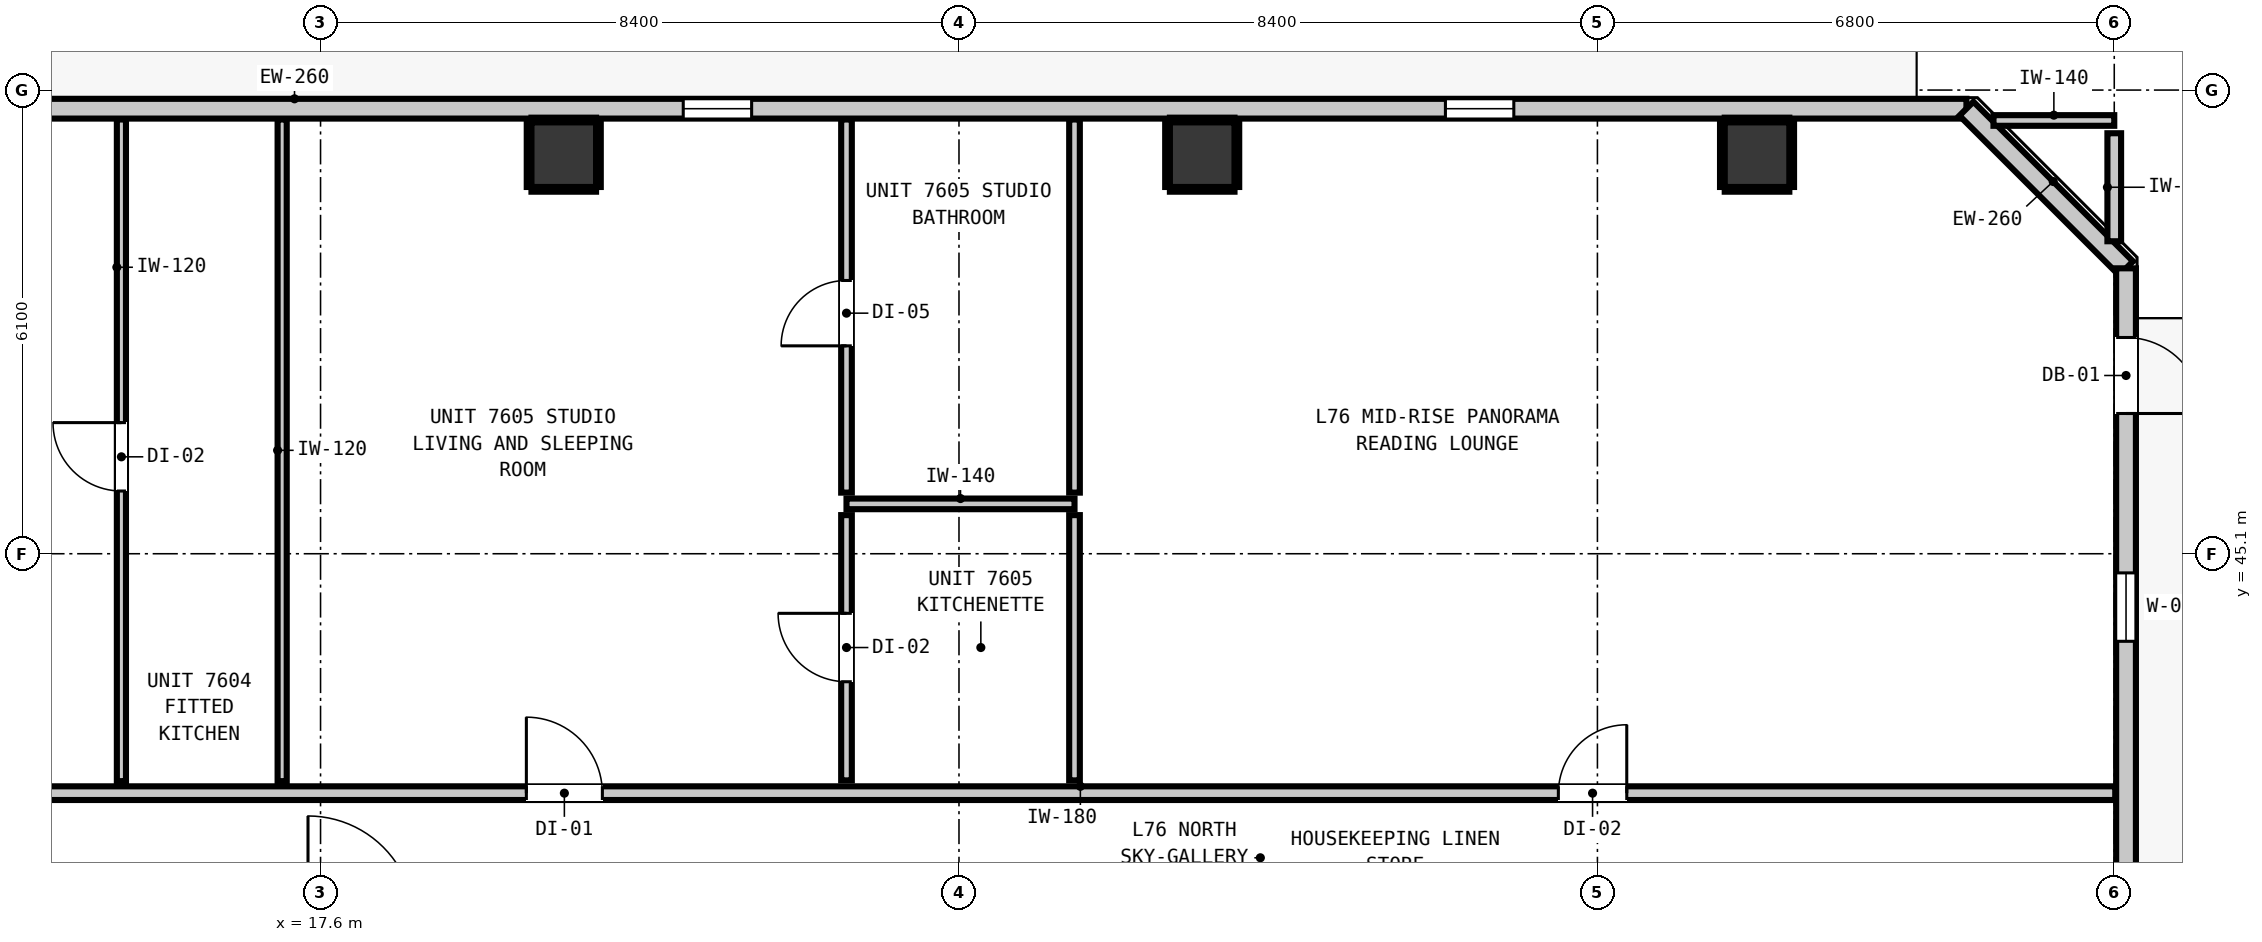
"""IFC4 building model, lengths in metres.
Left out: names, types, materials, properties, quantities, classifications, styles, units other than length and angle.
Written with IfcOpenShell. Run it as: python <this file> out.ifc"""

import sys

from ifc_helpers import new_model, si_unit, direction, frame, frame_2d, origin, origin_2d, place, context, subcontext, project, spatial, rectangle, extrude, element, fill, save


model = new_model("IFC4")
c1 = context("Model", 3, precision=1e-05, world=origin(), true_north=direction((0.0, 1.0)))
c2 = subcontext(c1, "Body", "Model", "MODEL_VIEW")
j1 = project(units=[si_unit("LENGTHUNIT", "METRE"), si_unit("PLANEANGLEUNIT", "RADIAN")], contexts=[c1])
p1 = place(None, origin())
s1 = spatial("IfcSite", under=j1, at=p1, CompositionType="ELEMENT")
p2 = place(p1, origin())
s2 = spatial("IfcBuilding", under=s1, at=p2, CompositionType="ELEMENT")
p3 = place(p2, frame((0.0, 0.0, 262.24)))
s3 = spatial("IfcBuildingStorey", under=s2, at=p3, CompositionType="ELEMENT", Elevation=262.24)
for number, where, z_axis, x_axis in (
    (1, (20.8, 50.35, 0.0), (0.0, 0.0, 1.0), (1.0, 0.0, 0.0)),
    (2, (29.2, 50.35, 0.0), (0.0, 0.0, 1.0), (1.0, 0.0, 0.0)),
    (3, (36.5, 50.35, 0.0), (0.0, 0.0, 1.0), (1.0, 0.0, 0.0)),
):
    element("IfcColumn", number, at=place(p3, frame(where, z_axis=z_axis, x_axis=x_axis)), inside=s3, PredefinedType="COLUMN", context=c2, shape_type="SweptSolid", body=[
        extrude(rectangle(XDim=0.85, YDim=0.85, at=origin_2d()), origin(), (0.0, 0.0, 1.0), 3.32),
    ])
p4 = place(p3, frame((6.545, 50.955, 0.0), z_axis=(0.0, 0.0, 1.0), x_axis=(1.0, 0.0, 0.0)))
e4 = element("IfcWall", 4, at=p4, inside=s3, PredefinedType="STANDARD", context=c2, shape_type="SweptSolid", body=[
    extrude(rectangle(XDim=32.71, YDim=0.26, at=frame_2d((16.355, 0.0))), origin(), (0.0, 0.0, 1.0), 3.1),
])
p5 = place(p4, frame((2.665, 0.0, 0.0)))
e5 = element("IfcOpeningElement", 5, at=p5, cuts=e4, PredefinedType="OPENING", context=c2, shape_type="SweptSolid", body=[
    extrude(rectangle(XDim=1.0, YDim=2.15, at=frame_2d((0.5, 1.075))), frame((0.0, 0.14, 0.0), z_axis=(0.0, -1.0, 0.0), x_axis=(1.0, 0.0, 0.0)), (0.0, 0.0, 1.0), 0.28),
])
p6 = place(p4, frame((4.698, 0.0, 0.85)))
e6 = element("IfcOpeningElement", 6, at=p6, cuts=e4, PredefinedType="OPENING", context=c2, shape_type="SweptSolid", body=[
    extrude(rectangle(XDim=0.9, YDim=1.5, at=frame_2d((0.45, 0.75))), frame((0.0, 0.14, 0.0), z_axis=(0.0, -1.0, 0.0), x_axis=(1.0, 0.0, 0.0)), (0.0, 0.0, 1.0), 0.28),
])
p7 = place(p4, frame((0.509, 0.0, 0.85)))
e7 = element("IfcOpeningElement", 7, at=p7, cuts=e4, PredefinedType="OPENING", context=c2, shape_type="SweptSolid", body=[
    extrude(rectangle(XDim=0.9, YDim=1.5, at=frame_2d((0.45, 0.75))), frame((0.0, 0.14, 0.0), z_axis=(0.0, -1.0, 0.0), x_axis=(1.0, 0.0, 0.0)), (0.0, 0.0, 1.0), 0.28),
])
p8 = place(p4, frame((15.827, 0.0, 0.85)))
e8 = element("IfcOpeningElement", 8, at=p8, cuts=e4, PredefinedType="OPENING", context=c2, shape_type="SweptSolid", body=[
    extrude(rectangle(XDim=0.9, YDim=1.5, at=frame_2d((0.45, 0.75))), frame((0.0, 0.14, 0.0), z_axis=(0.0, -1.0, 0.0), x_axis=(1.0, 0.0, 0.0)), (0.0, 0.0, 1.0), 0.28),
])
p9 = place(p4, frame((25.855, 0.0, 0.85)))
e9 = element("IfcOpeningElement", 9, at=p9, cuts=e4, PredefinedType="OPENING", context=c2, shape_type="SweptSolid", body=[
    extrude(rectangle(XDim=0.9, YDim=1.5, at=frame_2d((0.45, 0.75))), frame((0.0, 0.14, 0.0), z_axis=(0.0, -1.0, 0.0), x_axis=(1.0, 0.0, 0.0)), (0.0, 0.0, 1.0), 0.28),
])
p10 = place(p3, frame((39.255, 50.955, 0.0), z_axis=(0.0, 0.0, 1.0), x_axis=(0.707106781187, -0.707106781187, 0.0)))
e10 = element("IfcWall", 10, at=p10, inside=s3, PredefinedType="STANDARD", context=c2, shape_type="SweptSolid", body=[
    extrude(rectangle(XDim=2.97, YDim=0.26, at=frame_2d((1.485, 0.0))), origin(), (0.0, 0.0, 1.0), 3.1),
])
p11 = place(p3, frame((41.355, 48.855, 0.0), z_axis=(0.0, 0.0, 1.0), x_axis=(0.0, -1.0, 0.0)))
e11 = element("IfcWall", 11, at=p11, inside=s3, PredefinedType="STANDARD", context=c2, shape_type="SweptSolid", body=[
    extrude(rectangle(XDim=30.31, YDim=0.26, at=frame_2d((15.155, 0.0))), origin(), (0.0, 0.0, 1.0), 3.1),
])
p12 = place(p11, frame((0.91, 0.0, 0.0)))
e12 = element("IfcOpeningElement", 12, at=p12, cuts=e11, PredefinedType="OPENING", context=c2, shape_type="SweptSolid", body=[
    extrude(rectangle(XDim=1.0, YDim=2.15, at=frame_2d((0.5, 1.075))), frame((0.0, 0.14, 0.0), z_axis=(0.0, -1.0, 0.0), x_axis=(1.0, 0.0, 0.0)), (0.0, 0.0, 1.0), 0.28),
])
p13 = place(p11, frame((4.007, 0.0, 0.85)))
e13 = element("IfcOpeningElement", 13, at=p13, cuts=e11, PredefinedType="OPENING", context=c2, shape_type="SweptSolid", body=[
    extrude(rectangle(XDim=0.9, YDim=1.5, at=frame_2d((0.45, 0.75))), frame((0.0, 0.14, 0.0), z_axis=(0.0, -1.0, 0.0), x_axis=(1.0, 0.0, 0.0)), (0.0, 0.0, 1.0), 0.28),
])
p14 = place(p3, frame((4.587, 41.95, 0.0), z_axis=(0.0, 0.0, 1.0), x_axis=(1.0, 0.0, 0.0)))
e14 = element("IfcWall", 14, at=p14, inside=s3, PredefinedType="PARTITIONING", context=c2, shape_type="SweptSolid", body=[
    extrude(rectangle(XDim=36.626, YDim=0.18, at=frame_2d((18.313, 0.0))), origin(), (0.0, 0.0, 1.0), 3.1),
])
p15 = place(p14, frame((6.639, 0.0, 0.0)))
e15 = element("IfcOpeningElement", 15, at=p15, cuts=e14, PredefinedType="OPENING", context=c2, shape_type="SweptSolid", body=[
    extrude(rectangle(XDim=1.0, YDim=2.15, at=frame_2d((0.5, 1.075))), frame((0.0, 0.1, 0.0), z_axis=(0.0, -1.0, 0.0), x_axis=(1.0, 0.0, 0.0)), (0.0, 0.0, 1.0), 0.2),
])
p16 = place(p14, frame((15.721, 0.0, 0.0)))
e16 = element("IfcOpeningElement", 16, at=p16, cuts=e14, PredefinedType="OPENING", context=c2, shape_type="SweptSolid", body=[
    extrude(rectangle(XDim=1.0, YDim=2.15, at=frame_2d((0.5, 1.075))), frame((0.0, 0.1, 0.0), z_axis=(0.0, -1.0, 0.0), x_axis=(1.0, 0.0, 0.0)), (0.0, 0.0, 1.0), 0.2),
])
p17 = place(p14, frame((29.299, 0.0, 0.0)))
e17 = element("IfcOpeningElement", 17, at=p17, cuts=e14, PredefinedType="OPENING", context=c2, shape_type="SweptSolid", body=[
    extrude(rectangle(XDim=0.9, YDim=2.1, at=frame_2d((0.45, 1.05))), frame((0.0, 0.1, 0.0), z_axis=(0.0, -1.0, 0.0), x_axis=(1.0, 0.0, 0.0)), (0.0, 0.0, 1.0), 0.2),
])
p18 = place(p3, frame((24.52, 45.756, 0.0), z_axis=(0.0, 0.0, 1.0), x_axis=(1.0, 0.0, 0.0)))
e18 = element("IfcWall", 18, at=p18, inside=s3, PredefinedType="PARTITIONING", context=c2, shape_type="SweptSolid", body=[
    extrude(rectangle(XDim=3.0, YDim=0.14, at=frame_2d((1.5, 0.0))), origin(), (0.0, 0.0, 1.0), 3.1),
])
p19 = place(p3, frame((39.611, 50.8, 0.0), z_axis=(0.0, 0.0, 1.0), x_axis=(1.0, 0.0, 0.0)))
e19 = element("IfcWall", 19, at=p19, inside=s3, PredefinedType="PARTITIONING", context=c2, shape_type="SweptSolid", body=[
    extrude(rectangle(XDim=1.589, YDim=0.14, at=frame_2d((0.794, 0.0))), origin(), (0.0, 0.0, 1.0), 3.1),
])
p20 = place(p3, frame((41.2, 49.211, 0.0), z_axis=(0.0, 0.0, 1.0), x_axis=(0.0, 1.0, 0.0)))
e20 = element("IfcWall", 20, at=p20, inside=s3, PredefinedType="PARTITIONING", context=c2, shape_type="SweptSolid", body=[
    extrude(rectangle(XDim=1.421, YDim=0.18, at=frame_2d((0.71, 0.0))), origin(), (0.0, 0.0, 1.0), 3.1),
])
p21 = place(p3, frame((24.52, 42.118, 0.0), z_axis=(0.0, 0.0, 1.0), x_axis=(0.0, 1.0, 0.0)))
e21 = element("IfcWall", 21, at=p21, inside=s3, PredefinedType="PARTITIONING", context=c2, shape_type="SweptSolid", body=[
    extrude(rectangle(XDim=3.49, YDim=0.14, at=frame_2d((1.745, 0.0))), origin(), (0.0, 0.0, 1.0), 3.1),
])
p22 = place(p21, frame((1.298, 0.0, 0.0)))
e22 = element("IfcOpeningElement", 22, at=p22, cuts=e21, PredefinedType="OPENING", context=c2, shape_type="SweptSolid", body=[
    extrude(rectangle(XDim=0.9, YDim=2.1, at=frame_2d((0.45, 1.05))), frame((0.0, 0.08, 0.0), z_axis=(0.0, -1.0, 0.0), x_axis=(1.0, 0.0, 0.0)), (0.0, 0.0, 1.0), 0.16),
])
p23 = place(p3, frame((24.52, 45.904, 0.0), z_axis=(0.0, 0.0, 1.0), x_axis=(0.0, 1.0, 0.0)))
e23 = element("IfcWall", 23, at=p23, inside=s3, PredefinedType="PARTITIONING", context=c2, shape_type="SweptSolid", body=[
    extrude(rectangle(XDim=4.909, YDim=0.14, at=frame_2d((2.455, 0.0))), origin(), (0.0, 0.0, 1.0), 3.1),
])
p24 = place(p23, frame((1.931, 0.0, 0.0)))
e24 = element("IfcOpeningElement", 24, at=p24, cuts=e23, PredefinedType="OPENING", context=c2, shape_type="SweptSolid", body=[
    extrude(rectangle(XDim=0.86, YDim=2.02, at=frame_2d((0.43, 1.01))), frame((0.0, 0.08, 0.0), z_axis=(0.0, -1.0, 0.0), x_axis=(1.0, 0.0, 0.0)), (0.0, 0.0, 1.0), 0.16),
])
p25 = place(p3, frame((27.52, 42.118, 0.0), z_axis=(0.0, 0.0, 1.0), x_axis=(0.0, 1.0, 0.0)))
e25 = element("IfcWall", 25, at=p25, inside=s3, PredefinedType="PARTITIONING", context=c2, shape_type="SweptSolid", body=[
    extrude(rectangle(XDim=3.49, YDim=0.14, at=frame_2d((1.745, 0.0))), origin(), (0.0, 0.0, 1.0), 3.1),
])
p26 = place(p3, frame((27.52, 45.904, 0.0), z_axis=(0.0, 0.0, 1.0), x_axis=(0.0, 1.0, 0.0)))
e26 = element("IfcWall", 26, at=p26, inside=s3, PredefinedType="PARTITIONING", context=c2, shape_type="SweptSolid", body=[
    extrude(rectangle(XDim=4.909, YDim=0.14, at=frame_2d((2.455, 0.0))), origin(), (0.0, 0.0, 1.0), 3.1),
])
p27 = place(p3, frame((14.98, 42.108, 0.0), z_axis=(0.0, 0.0, 1.0), x_axis=(0.0, 1.0, 0.0)))
e27 = element("IfcWall", 27, at=p27, inside=s3, PredefinedType="PARTITIONING", context=c2, shape_type="SweptSolid", body=[
    extrude(rectangle(XDim=8.705, YDim=0.12, at=frame_2d((4.353, 0.0))), origin(), (0.0, 0.0, 1.0), 3.1),
])
p28 = place(p27, frame((3.817, 0.0, 0.0)))
e28 = element("IfcOpeningElement", 28, at=p28, cuts=e27, PredefinedType="OPENING", context=c2, shape_type="SweptSolid", body=[
    extrude(rectangle(XDim=0.9, YDim=2.1, at=frame_2d((0.45, 1.05))), frame((0.0, 0.07, 0.0), z_axis=(0.0, -1.0, 0.0), x_axis=(1.0, 0.0, 0.0)), (0.0, 0.0, 1.0), 0.14),
])
p29 = place(p3, frame((17.095, 42.108, 0.0), z_axis=(0.0, 0.0, 1.0), x_axis=(0.0, 1.0, 0.0)))
e29 = element("IfcWall", 29, at=p29, inside=s3, PredefinedType="PARTITIONING", context=c2, shape_type="SweptSolid", body=[
    extrude(rectangle(XDim=8.705, YDim=0.12, at=frame_2d((4.353, 0.0))), origin(), (0.0, 0.0, 1.0), 3.1),
])
for number, where, z_axis, x_axis in (
    (30, (20.375, 49.893, 0.0), (0.0, 0.0, 1.0), (1.0, 0.0, 0.0)),
    (31, (20.375, 50.807, 0.0), (0.0, 0.0, 1.0), (1.0, 0.0, 0.0)),
):
    element("IfcWall", number, at=place(p3, frame(where, z_axis=z_axis, x_axis=x_axis)), inside=s3, PredefinedType="PARTITIONING", context=c2, shape_type="SweptSolid", body=[
        extrude(rectangle(XDim=0.85, YDim=0.06, at=frame_2d((0.425, 0.0))), origin(), (0.0, 0.0, 1.0), 1.45),
    ])
for number, where, z_axis, x_axis in (
    (32, (20.343, 49.925, 0.0), (0.0, 0.0, 1.0), (0.0, 1.0, 0.0)),
    (33, (21.257, 49.925, 0.0), (0.0, 0.0, 1.0), (0.0, 1.0, 0.0)),
):
    element("IfcWall", number, at=place(p3, frame(where, z_axis=z_axis, x_axis=x_axis)), inside=s3, PredefinedType="PARTITIONING", context=c2, shape_type="SweptSolid", body=[
        extrude(rectangle(XDim=0.85, YDim=0.06, at=frame_2d((0.425, 0.0))), origin(), (0.0, 0.0, 1.0), 1.45),
    ])
for number, where, z_axis, x_axis in (
    (34, (28.775, 49.893, 0.0), (0.0, 0.0, 1.0), (1.0, 0.0, 0.0)),
    (35, (28.775, 50.807, 0.0), (0.0, 0.0, 1.0), (1.0, 0.0, 0.0)),
):
    element("IfcWall", number, at=place(p3, frame(where, z_axis=z_axis, x_axis=x_axis)), inside=s3, PredefinedType="PARTITIONING", context=c2, shape_type="SweptSolid", body=[
        extrude(rectangle(XDim=0.85, YDim=0.06, at=frame_2d((0.425, 0.0))), origin(), (0.0, 0.0, 1.0), 1.45),
    ])
for number, where, z_axis, x_axis in (
    (36, (28.743, 49.925, 0.0), (0.0, 0.0, 1.0), (0.0, 1.0, 0.0)),
    (37, (29.657, 49.925, 0.0), (0.0, 0.0, 1.0), (0.0, 1.0, 0.0)),
):
    element("IfcWall", number, at=place(p3, frame(where, z_axis=z_axis, x_axis=x_axis)), inside=s3, PredefinedType="PARTITIONING", context=c2, shape_type="SweptSolid", body=[
        extrude(rectangle(XDim=0.85, YDim=0.06, at=frame_2d((0.425, 0.0))), origin(), (0.0, 0.0, 1.0), 1.45),
    ])
for number, where, z_axis, x_axis in (
    (38, (36.075, 49.893, 0.0), (0.0, 0.0, 1.0), (1.0, 0.0, 0.0)),
    (39, (36.075, 50.807, 0.0), (0.0, 0.0, 1.0), (1.0, 0.0, 0.0)),
):
    element("IfcWall", number, at=place(p3, frame(where, z_axis=z_axis, x_axis=x_axis)), inside=s3, PredefinedType="PARTITIONING", context=c2, shape_type="SweptSolid", body=[
        extrude(rectangle(XDim=0.85, YDim=0.06, at=frame_2d((0.425, 0.0))), origin(), (0.0, 0.0, 1.0), 1.45),
    ])
for number, where, z_axis, x_axis in (
    (40, (36.043, 49.925, 0.0), (0.0, 0.0, 1.0), (0.0, 1.0, 0.0)),
    (41, (36.957, 49.925, 0.0), (0.0, 0.0, 1.0), (0.0, 1.0, 0.0)),
):
    element("IfcWall", number, at=place(p3, frame(where, z_axis=z_axis, x_axis=x_axis)), inside=s3, PredefinedType="PARTITIONING", context=c2, shape_type="SweptSolid", body=[
        extrude(rectangle(XDim=0.85, YDim=0.06, at=frame_2d((0.425, 0.0))), origin(), (0.0, 0.0, 1.0), 1.45),
    ])
p30 = place(p12, origin())
e42 = element("IfcDoor", 42, at=p30, inside=s3, OperationType="SINGLE_SWING_RIGHT", PredefinedType="DOOR", context=c2, shape_type="SweptSolid", body=[
    extrude(rectangle(XDim=1.0, YDim=2.15, at=frame_2d((0.5, 1.075))), frame((0.0, 0.025, 0.0), z_axis=(0.0, -1.0, 0.0), x_axis=(1.0, 0.0, 0.0)), (0.0, 0.0, 1.0), 0.05),
])
fill(e12, e42)
p31 = place(p8, origin())
e43 = element("IfcWindow", 43, at=p31, inside=s3, PartitioningType="SINGLE_PANEL", PredefinedType="WINDOW", context=c2, shape_type="SweptSolid", body=[
    extrude(rectangle(XDim=0.9, YDim=1.5, at=frame_2d((0.45, 0.75))), frame((0.0, 0.03, 0.0), z_axis=(0.0, -1.0, 0.0), x_axis=(1.0, 0.0, 0.0)), (0.0, 0.0, 1.0), 0.06),
])
fill(e8, e43)
p32 = place(p9, origin())
e44 = element("IfcWindow", 44, at=p32, inside=s3, PartitioningType="SINGLE_PANEL", PredefinedType="WINDOW", context=c2, shape_type="SweptSolid", body=[
    extrude(rectangle(XDim=0.9, YDim=1.5, at=frame_2d((0.45, 0.75))), frame((0.0, 0.03, 0.0), z_axis=(0.0, -1.0, 0.0), x_axis=(1.0, 0.0, 0.0)), (0.0, 0.0, 1.0), 0.06),
])
fill(e9, e44)
p33 = place(p13, origin())
e45 = element("IfcWindow", 45, at=p33, inside=s3, PartitioningType="SINGLE_PANEL", PredefinedType="WINDOW", context=c2, shape_type="SweptSolid", body=[
    extrude(rectangle(XDim=0.9, YDim=1.5, at=frame_2d((0.45, 0.75))), frame((0.0, 0.03, 0.0), z_axis=(0.0, -1.0, 0.0), x_axis=(1.0, 0.0, 0.0)), (0.0, 0.0, 1.0), 0.06),
])
fill(e13, e45)
p34 = place(p28, origin())
e46 = element("IfcDoor", 46, at=p34, inside=s3, OperationType="SINGLE_SWING_RIGHT", PredefinedType="DOOR", context=c2, shape_type="SweptSolid", body=[
    extrude(rectangle(XDim=0.9, YDim=2.1, at=frame_2d((0.45, 1.05))), frame((0.0, 0.025, 0.0), z_axis=(0.0, -1.0, 0.0), x_axis=(1.0, 0.0, 0.0)), (0.0, 0.0, 1.0), 0.05),
])
fill(e28, e46)
p35 = place(p16, origin())
e47 = element("IfcDoor", 47, at=p35, inside=s3, OperationType="SINGLE_SWING_LEFT", PredefinedType="DOOR", context=c2, shape_type="SweptSolid", body=[
    extrude(rectangle(XDim=1.0, YDim=2.15, at=frame_2d((0.5, 1.075))), frame((0.0, 0.025, 0.0), z_axis=(0.0, -1.0, 0.0), x_axis=(1.0, 0.0, 0.0)), (0.0, 0.0, 1.0), 0.05),
])
fill(e16, e47)
p36 = place(p22, origin())
e48 = element("IfcDoor", 48, at=p36, inside=s3, OperationType="SINGLE_SWING_RIGHT", PredefinedType="DOOR", context=c2, shape_type="SweptSolid", body=[
    extrude(rectangle(XDim=0.9, YDim=2.1, at=frame_2d((0.45, 1.05))), frame((0.0, 0.025, 0.0), z_axis=(0.0, -1.0, 0.0), x_axis=(1.0, 0.0, 0.0)), (0.0, 0.0, 1.0), 0.05),
])
fill(e22, e48)
p37 = place(p24, origin())
e49 = element("IfcDoor", 49, at=p37, inside=s3, OperationType="SINGLE_SWING_LEFT", PredefinedType="DOOR", context=c2, shape_type="SweptSolid", body=[
    extrude(rectangle(XDim=0.86, YDim=2.02, at=frame_2d((0.43, 1.01))), frame((0.0, 0.025, 0.0), z_axis=(0.0, -1.0, 0.0), x_axis=(1.0, 0.0, 0.0)), (0.0, 0.0, 1.0), 0.05),
])
fill(e24, e49)
p38 = place(p17, origin())
e50 = element("IfcDoor", 50, at=p38, inside=s3, OperationType="SINGLE_SWING_RIGHT", PredefinedType="DOOR", context=c2, shape_type="SweptSolid", body=[
    extrude(rectangle(XDim=0.9, YDim=2.1, at=frame_2d((0.45, 1.05))), frame((0.0, 0.025, 0.0), z_axis=(0.0, -1.0, 0.0), x_axis=(1.0, 0.0, 0.0)), (0.0, 0.0, 1.0), 0.05),
])
fill(e17, e50)
save(model, sys.argv[1])
